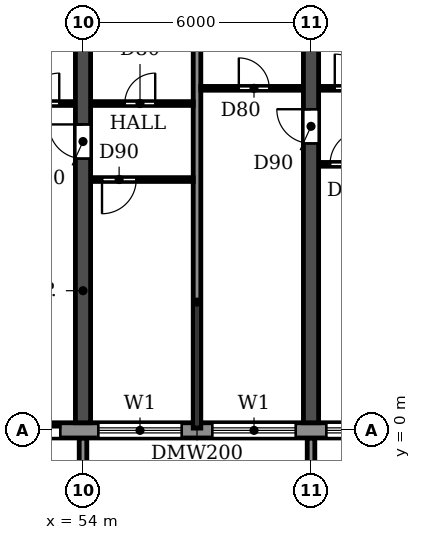
"""IFC4 building model, lengths in metres.
Left out: names, types, materials, properties, quantities, classifications, styles, units other than length and angle.
Written with IfcOpenShell. Run it as: python <this file> out.ifc"""

import sys

from ifc_helpers import new_model, si_unit, direction, frame, frame_2d, origin, place, context, subcontext, project, spatial, polyline, rectangle, outline, extrude, source, transform, mapped, element, fill, save


model = new_model("IFC4")
c1 = context("Model", 3, precision=1e-05, world=origin(), true_north=direction((0.0, 1.0)))
c2 = subcontext(c1, "Body", "Model", "MODEL_VIEW")
j1 = project(units=[si_unit("LENGTHUNIT", "METRE"), si_unit("PLANEANGLEUNIT", "RADIAN")], contexts=[c1])
p1 = place(None, origin())
s1 = spatial("IfcSite", under=j1, at=p1, CompositionType="ELEMENT")
p2 = place(p1, origin())
s2 = spatial("IfcBuilding", under=s1, at=p2, CompositionType="ELEMENT")
p3 = place(p2, frame((0.0, 0.0, 33.3)))
s3 = spatial("IfcBuildingStorey", under=s2, at=p3, CompositionType="ELEMENT", Elevation=33.3)
p4 = place(p3, frame((54.0, 0.2, 0.0), z_axis=(0.0, 0.0, 1.0), x_axis=(0.0, 1.0, 0.0)))
e1 = element("IfcWall", 1, at=p4, inside=s3, PredefinedType="SHEAR", context=c2, shape_type="SweptSolid", body=[
    extrude(rectangle(XDim=11.65, YDim=0.4, at=frame_2d((5.825, 0.0))), origin(), (0.0, 0.0, 1.0), 3.05),
])
p5 = place(p4, frame((6.95, 0.0, 0.0)))
e2 = element("IfcOpeningElement", 2, at=p5, cuts=e1, PredefinedType="OPENING", context=c2, shape_type="SweptSolid", body=[
    extrude(rectangle(XDim=0.9, YDim=2.1, at=frame_2d((0.45, 1.05))), frame((0.0, 0.21, 0.0), z_axis=(0.0, -1.0, 0.0), x_axis=(1.0, 0.0, 0.0)), (0.0, 0.0, 1.0), 0.42),
])
p6 = place(p3, frame((60.0, 0.2, 0.0), z_axis=(0.0, 0.0, 1.0), x_axis=(0.0, 1.0, 0.0)))
e3 = element("IfcWall", 3, at=p6, inside=s3, PredefinedType="SHEAR", context=c2, shape_type="SweptSolid", body=[
    extrude(rectangle(XDim=11.65, YDim=0.4, at=frame_2d((5.825, 0.0))), origin(), (0.0, 0.0, 1.0), 3.05),
])
p7 = place(p6, frame((7.35, 0.0, 0.0)))
e4 = element("IfcOpeningElement", 4, at=p7, cuts=e3, PredefinedType="OPENING", context=c2, shape_type="SweptSolid", body=[
    extrude(rectangle(XDim=0.9, YDim=2.1, at=frame_2d((0.45, 1.05))), frame((0.0, 0.21, 0.0), z_axis=(0.0, -1.0, 0.0), x_axis=(1.0, 0.0, 0.0)), (0.0, 0.0, 1.0), 0.42),
])
p8 = place(p3, frame((4.683, 0.0, 0.0), z_axis=(0.0, 0.0, 1.0), x_axis=(1.0, 0.0, 0.0)))
e5 = element("IfcWall", 5, at=p8, inside=s3, PredefinedType="STANDARD", context=c2, shape_type="SweptSolid", body=[
    extrude(rectangle(XDim=92.634, YDim=0.4, at=frame_2d((46.317, 0.0))), origin(), (0.0, 0.0, 1.0), 3.05),
])
p9 = place(p8, frame((1.717, 0.0, 0.9)))
e6 = element("IfcOpeningElement", 6, at=p9, cuts=e5, PredefinedType="OPENING", context=c2, shape_type="SweptSolid", body=[
    extrude(rectangle(XDim=2.2, YDim=1.5, at=frame_2d((1.1, 0.75))), frame((0.0, 0.21, 0.0), z_axis=(0.0, -1.0, 0.0), x_axis=(1.0, 0.0, 0.0)), (0.0, 0.0, 1.0), 0.42),
])
p10 = place(p8, frame((4.717, 0.0, 0.9)))
e7 = element("IfcOpeningElement", 7, at=p10, cuts=e5, PredefinedType="OPENING", context=c2, shape_type="SweptSolid", body=[
    extrude(rectangle(XDim=2.2, YDim=1.5, at=frame_2d((1.1, 0.75))), frame((0.0, 0.21, 0.0), z_axis=(0.0, -1.0, 0.0), x_axis=(1.0, 0.0, 0.0)), (0.0, 0.0, 1.0), 0.42),
])
p11 = place(p8, frame((7.917, 0.0, 0.0)))
e8 = element("IfcOpeningElement", 8, at=p11, cuts=e5, PredefinedType="OPENING", context=c2, shape_type="SweptSolid", body=[
    extrude(rectangle(XDim=1.8, YDim=2.4, at=frame_2d((0.9, 1.2))), frame((0.0, 0.21, 0.0), z_axis=(0.0, -1.0, 0.0), x_axis=(1.0, 0.0, 0.0)), (0.0, 0.0, 1.0), 0.42),
])
p12 = place(p8, frame((10.717, 0.0, 0.9)))
e9 = element("IfcOpeningElement", 9, at=p12, cuts=e5, PredefinedType="OPENING", context=c2, shape_type="SweptSolid", body=[
    extrude(rectangle(XDim=2.2, YDim=1.5, at=frame_2d((1.1, 0.75))), frame((0.0, 0.21, 0.0), z_axis=(0.0, -1.0, 0.0), x_axis=(1.0, 0.0, 0.0)), (0.0, 0.0, 1.0), 0.42),
])
p13 = place(p8, frame((13.717, 0.0, 0.9)))
e10 = element("IfcOpeningElement", 10, at=p13, cuts=e5, PredefinedType="OPENING", context=c2, shape_type="SweptSolid", body=[
    extrude(rectangle(XDim=2.2, YDim=1.5, at=frame_2d((1.1, 0.75))), frame((0.0, 0.21, 0.0), z_axis=(0.0, -1.0, 0.0), x_axis=(1.0, 0.0, 0.0)), (0.0, 0.0, 1.0), 0.42),
])
p14 = place(p8, frame((16.717, 0.0, 0.9)))
e11 = element("IfcOpeningElement", 11, at=p14, cuts=e5, PredefinedType="OPENING", context=c2, shape_type="SweptSolid", body=[
    extrude(rectangle(XDim=2.2, YDim=1.5, at=frame_2d((1.1, 0.75))), frame((0.0, 0.21, 0.0), z_axis=(0.0, -1.0, 0.0), x_axis=(1.0, 0.0, 0.0)), (0.0, 0.0, 1.0), 0.42),
])
p15 = place(p8, frame((19.717, 0.0, 0.9)))
e12 = element("IfcOpeningElement", 12, at=p15, cuts=e5, PredefinedType="OPENING", context=c2, shape_type="SweptSolid", body=[
    extrude(rectangle(XDim=2.2, YDim=1.5, at=frame_2d((1.1, 0.75))), frame((0.0, 0.21, 0.0), z_axis=(0.0, -1.0, 0.0), x_axis=(1.0, 0.0, 0.0)), (0.0, 0.0, 1.0), 0.42),
])
p16 = place(p8, frame((22.917, 0.0, 0.0)))
e13 = element("IfcOpeningElement", 13, at=p16, cuts=e5, PredefinedType="OPENING", context=c2, shape_type="SweptSolid", body=[
    extrude(rectangle(XDim=1.8, YDim=2.4, at=frame_2d((0.9, 1.2))), frame((0.0, 0.21, 0.0), z_axis=(0.0, -1.0, 0.0), x_axis=(1.0, 0.0, 0.0)), (0.0, 0.0, 1.0), 0.42),
])
p17 = place(p8, frame((25.717, 0.0, 0.9)))
e14 = element("IfcOpeningElement", 14, at=p17, cuts=e5, PredefinedType="OPENING", context=c2, shape_type="SweptSolid", body=[
    extrude(rectangle(XDim=2.2, YDim=1.5, at=frame_2d((1.1, 0.75))), frame((0.0, 0.21, 0.0), z_axis=(0.0, -1.0, 0.0), x_axis=(1.0, 0.0, 0.0)), (0.0, 0.0, 1.0), 0.42),
])
p18 = place(p8, frame((28.717, 0.0, 0.9)))
e15 = element("IfcOpeningElement", 15, at=p18, cuts=e5, PredefinedType="OPENING", context=c2, shape_type="SweptSolid", body=[
    extrude(rectangle(XDim=2.2, YDim=1.5, at=frame_2d((1.1, 0.75))), frame((0.0, 0.21, 0.0), z_axis=(0.0, -1.0, 0.0), x_axis=(1.0, 0.0, 0.0)), (0.0, 0.0, 1.0), 0.42),
])
p19 = place(p8, frame((31.717, 0.0, 0.9)))
e16 = element("IfcOpeningElement", 16, at=p19, cuts=e5, PredefinedType="OPENING", context=c2, shape_type="SweptSolid", body=[
    extrude(rectangle(XDim=2.2, YDim=1.5, at=frame_2d((1.1, 0.75))), frame((0.0, 0.21, 0.0), z_axis=(0.0, -1.0, 0.0), x_axis=(1.0, 0.0, 0.0)), (0.0, 0.0, 1.0), 0.42),
])
p20 = place(p8, frame((34.717, 0.0, 0.9)))
e17 = element("IfcOpeningElement", 17, at=p20, cuts=e5, PredefinedType="OPENING", context=c2, shape_type="SweptSolid", body=[
    extrude(rectangle(XDim=2.2, YDim=1.5, at=frame_2d((1.1, 0.75))), frame((0.0, 0.21, 0.0), z_axis=(0.0, -1.0, 0.0), x_axis=(1.0, 0.0, 0.0)), (0.0, 0.0, 1.0), 0.42),
])
p21 = place(p8, frame((37.717, 0.0, 0.9)))
e18 = element("IfcOpeningElement", 18, at=p21, cuts=e5, PredefinedType="OPENING", context=c2, shape_type="SweptSolid", body=[
    extrude(rectangle(XDim=2.2, YDim=1.5, at=frame_2d((1.1, 0.75))), frame((0.0, 0.21, 0.0), z_axis=(0.0, -1.0, 0.0), x_axis=(1.0, 0.0, 0.0)), (0.0, 0.0, 1.0), 0.42),
])
p22 = place(p8, frame((40.717, 0.0, 0.9)))
e19 = element("IfcOpeningElement", 19, at=p22, cuts=e5, PredefinedType="OPENING", context=c2, shape_type="SweptSolid", body=[
    extrude(rectangle(XDim=2.2, YDim=1.5, at=frame_2d((1.1, 0.75))), frame((0.0, 0.21, 0.0), z_axis=(0.0, -1.0, 0.0), x_axis=(1.0, 0.0, 0.0)), (0.0, 0.0, 1.0), 0.42),
])
p23 = place(p8, frame((43.717, 0.0, 0.9)))
e20 = element("IfcOpeningElement", 20, at=p23, cuts=e5, PredefinedType="OPENING", context=c2, shape_type="SweptSolid", body=[
    extrude(rectangle(XDim=2.2, YDim=1.5, at=frame_2d((1.1, 0.75))), frame((0.0, 0.21, 0.0), z_axis=(0.0, -1.0, 0.0), x_axis=(1.0, 0.0, 0.0)), (0.0, 0.0, 1.0), 0.42),
])
p24 = place(p8, frame((46.917, 0.0, 0.0)))
e21 = element("IfcOpeningElement", 21, at=p24, cuts=e5, PredefinedType="OPENING", context=c2, shape_type="SweptSolid", body=[
    extrude(rectangle(XDim=1.8, YDim=2.4, at=frame_2d((0.9, 1.2))), frame((0.0, 0.21, 0.0), z_axis=(0.0, -1.0, 0.0), x_axis=(1.0, 0.0, 0.0)), (0.0, 0.0, 1.0), 0.42),
])
p25 = place(p8, frame((49.717, 0.0, 0.9)))
e22 = element("IfcOpeningElement", 22, at=p25, cuts=e5, PredefinedType="OPENING", context=c2, shape_type="SweptSolid", body=[
    extrude(rectangle(XDim=2.2, YDim=1.5, at=frame_2d((1.1, 0.75))), frame((0.0, 0.21, 0.0), z_axis=(0.0, -1.0, 0.0), x_axis=(1.0, 0.0, 0.0)), (0.0, 0.0, 1.0), 0.42),
])
p26 = place(p8, frame((52.717, 0.0, 0.9)))
e23 = element("IfcOpeningElement", 23, at=p26, cuts=e5, PredefinedType="OPENING", context=c2, shape_type="SweptSolid", body=[
    extrude(rectangle(XDim=2.2, YDim=1.5, at=frame_2d((1.1, 0.75))), frame((0.0, 0.21, 0.0), z_axis=(0.0, -1.0, 0.0), x_axis=(1.0, 0.0, 0.0)), (0.0, 0.0, 1.0), 0.42),
])
p27 = place(p8, frame((55.717, 0.0, 0.9)))
e24 = element("IfcOpeningElement", 24, at=p27, cuts=e5, PredefinedType="OPENING", context=c2, shape_type="SweptSolid", body=[
    extrude(rectangle(XDim=2.2, YDim=1.5, at=frame_2d((1.1, 0.75))), frame((0.0, 0.21, 0.0), z_axis=(0.0, -1.0, 0.0), x_axis=(1.0, 0.0, 0.0)), (0.0, 0.0, 1.0), 0.42),
])
p28 = place(p8, frame((58.917, 0.0, 0.0)))
e25 = element("IfcOpeningElement", 25, at=p28, cuts=e5, PredefinedType="OPENING", context=c2, shape_type="SweptSolid", body=[
    extrude(rectangle(XDim=1.8, YDim=2.4, at=frame_2d((0.9, 1.2))), frame((0.0, 0.21, 0.0), z_axis=(0.0, -1.0, 0.0), x_axis=(1.0, 0.0, 0.0)), (0.0, 0.0, 1.0), 0.42),
])
p29 = place(p8, frame((61.717, 0.0, 0.9)))
e26 = element("IfcOpeningElement", 26, at=p29, cuts=e5, PredefinedType="OPENING", context=c2, shape_type="SweptSolid", body=[
    extrude(rectangle(XDim=2.2, YDim=1.5, at=frame_2d((1.1, 0.75))), frame((0.0, 0.21, 0.0), z_axis=(0.0, -1.0, 0.0), x_axis=(1.0, 0.0, 0.0)), (0.0, 0.0, 1.0), 0.42),
])
p30 = place(p8, frame((64.717, 0.0, 0.9)))
e27 = element("IfcOpeningElement", 27, at=p30, cuts=e5, PredefinedType="OPENING", context=c2, shape_type="SweptSolid", body=[
    extrude(rectangle(XDim=2.2, YDim=1.5, at=frame_2d((1.1, 0.75))), frame((0.0, 0.21, 0.0), z_axis=(0.0, -1.0, 0.0), x_axis=(1.0, 0.0, 0.0)), (0.0, 0.0, 1.0), 0.42),
])
p31 = place(p8, frame((67.717, 0.0, 0.9)))
e28 = element("IfcOpeningElement", 28, at=p31, cuts=e5, PredefinedType="OPENING", context=c2, shape_type="SweptSolid", body=[
    extrude(rectangle(XDim=2.2, YDim=1.5, at=frame_2d((1.1, 0.75))), frame((0.0, 0.21, 0.0), z_axis=(0.0, -1.0, 0.0), x_axis=(1.0, 0.0, 0.0)), (0.0, 0.0, 1.0), 0.42),
])
p32 = place(p8, frame((70.917, 0.0, 0.0)))
e29 = element("IfcOpeningElement", 29, at=p32, cuts=e5, PredefinedType="OPENING", context=c2, shape_type="SweptSolid", body=[
    extrude(rectangle(XDim=1.8, YDim=2.4, at=frame_2d((0.9, 1.2))), frame((0.0, 0.21, 0.0), z_axis=(0.0, -1.0, 0.0), x_axis=(1.0, 0.0, 0.0)), (0.0, 0.0, 1.0), 0.42),
])
p33 = place(p8, frame((73.717, 0.0, 0.9)))
e30 = element("IfcOpeningElement", 30, at=p33, cuts=e5, PredefinedType="OPENING", context=c2, shape_type="SweptSolid", body=[
    extrude(rectangle(XDim=2.2, YDim=1.5, at=frame_2d((1.1, 0.75))), frame((0.0, 0.21, 0.0), z_axis=(0.0, -1.0, 0.0), x_axis=(1.0, 0.0, 0.0)), (0.0, 0.0, 1.0), 0.42),
])
p34 = place(p8, frame((76.717, 0.0, 0.9)))
e31 = element("IfcOpeningElement", 31, at=p34, cuts=e5, PredefinedType="OPENING", context=c2, shape_type="SweptSolid", body=[
    extrude(rectangle(XDim=2.2, YDim=1.5, at=frame_2d((1.1, 0.75))), frame((0.0, 0.21, 0.0), z_axis=(0.0, -1.0, 0.0), x_axis=(1.0, 0.0, 0.0)), (0.0, 0.0, 1.0), 0.42),
])
p35 = place(p8, frame((79.717, 0.0, 0.9)))
e32 = element("IfcOpeningElement", 32, at=p35, cuts=e5, PredefinedType="OPENING", context=c2, shape_type="SweptSolid", body=[
    extrude(rectangle(XDim=2.2, YDim=1.5, at=frame_2d((1.1, 0.75))), frame((0.0, 0.21, 0.0), z_axis=(0.0, -1.0, 0.0), x_axis=(1.0, 0.0, 0.0)), (0.0, 0.0, 1.0), 0.42),
])
p36 = place(p8, frame((82.717, 0.0, 0.9)))
e33 = element("IfcOpeningElement", 33, at=p36, cuts=e5, PredefinedType="OPENING", context=c2, shape_type="SweptSolid", body=[
    extrude(rectangle(XDim=2.2, YDim=1.5, at=frame_2d((1.1, 0.75))), frame((0.0, 0.21, 0.0), z_axis=(0.0, -1.0, 0.0), x_axis=(1.0, 0.0, 0.0)), (0.0, 0.0, 1.0), 0.42),
])
p37 = place(p8, frame((85.717, 0.0, 0.9)))
e34 = element("IfcOpeningElement", 34, at=p37, cuts=e5, PredefinedType="OPENING", context=c2, shape_type="SweptSolid", body=[
    extrude(rectangle(XDim=2.2, YDim=1.5, at=frame_2d((1.1, 0.75))), frame((0.0, 0.21, 0.0), z_axis=(0.0, -1.0, 0.0), x_axis=(1.0, 0.0, 0.0)), (0.0, 0.0, 1.0), 0.42),
])
p38 = place(p8, frame((88.717, 0.0, 0.9)))
e35 = element("IfcOpeningElement", 35, at=p38, cuts=e5, PredefinedType="OPENING", context=c2, shape_type="SweptSolid", body=[
    extrude(rectangle(XDim=2.2, YDim=1.5, at=frame_2d((1.1, 0.75))), frame((0.0, 0.21, 0.0), z_axis=(0.0, -1.0, 0.0), x_axis=(1.0, 0.0, 0.0)), (0.0, 0.0, 1.0), 0.42),
])
m1 = source(origin(), c2, "Body", "SweptSolid", [
    extrude(outline(polyline([(0.0, 0.0), (0.2, 0.0), (0.2, 1.65), (0.0, 1.65), (0.0, 0.0)])), origin(), (0.0, 0.0, 1.0), 3.1),
])
for number, where in (
    (36, (53.9, -1.85, 0.0)),
    (37, (59.9, -1.85, 0.0)),
):
    element("IfcWall", number, at=place(p3, frame(where)), inside=s3, PredefinedType="STANDARD", context=c2, shape_type="MappedRepresentation", body=[
        mapped(m1, transform((0.0, 0.0, 0.0))),
    ])
p39 = place(p3, frame((57.0, 0.06, 0.0), z_axis=(0.0, 0.0, 1.0), x_axis=(0.0, 1.0, 0.0)))
e38 = element("IfcWall", 38, at=p39, inside=s3, PredefinedType="PARTITIONING", context=c2, shape_type="SweptSolid", body=[
    extrude(rectangle(XDim=11.78, YDim=0.2, at=frame_2d((5.89, 0.0))), origin(), (0.0, 0.0, 1.0), 3.05),
])
p40 = place(p3, frame((54.21, 6.6, 0.0), z_axis=(0.0, 0.0, 1.0), x_axis=(1.0, 0.0, 0.0)))
e39 = element("IfcWall", 39, at=p40, inside=s3, PredefinedType="PARTITIONING", context=c2, shape_type="SweptSolid", body=[
    extrude(rectangle(XDim=2.69, YDim=0.1, at=frame_2d((1.345, 0.0))), origin(), (0.0, 0.0, 1.0), 3.05),
])
p41 = place(p40, frame((0.29, 0.0, 0.0)))
e40 = element("IfcOpeningElement", 40, at=p41, cuts=e39, PredefinedType="OPENING", context=c2, shape_type="SweptSolid", body=[
    extrude(rectangle(XDim=0.9, YDim=2.1, at=frame_2d((0.45, 1.05))), frame((0.0, 0.06, 0.0), z_axis=(0.0, -1.0, 0.0), x_axis=(1.0, 0.0, 0.0)), (0.0, 0.0, 1.0), 0.12),
])
p42 = place(p3, frame((60.21, 7.0, 0.0), z_axis=(0.0, 0.0, 1.0), x_axis=(1.0, 0.0, 0.0)))
e41 = element("IfcWall", 41, at=p42, inside=s3, PredefinedType="PARTITIONING", context=c2, shape_type="SweptSolid", body=[
    extrude(rectangle(XDim=2.84, YDim=0.1, at=frame_2d((1.42, 0.0))), origin(), (0.0, 0.0, 1.0), 3.05),
])
p43 = place(p42, frame((0.29, 0.0, 0.0)))
e42 = element("IfcOpeningElement", 42, at=p43, cuts=e41, PredefinedType="OPENING", context=c2, shape_type="SweptSolid", body=[
    extrude(rectangle(XDim=0.9, YDim=2.1, at=frame_2d((0.45, 1.05))), frame((0.0, 0.06, 0.0), z_axis=(0.0, -1.0, 0.0), x_axis=(1.0, 0.0, 0.0)), (0.0, 0.0, 1.0), 0.12),
])
p44 = place(p3, frame((51.9, 8.6, 0.0), z_axis=(0.0, 0.0, 1.0), x_axis=(1.0, 0.0, 0.0)))
e43 = element("IfcWall", 43, at=p44, inside=s3, PredefinedType="PARTITIONING", context=c2, shape_type="SweptSolid", body=[
    extrude(rectangle(XDim=1.89, YDim=0.1, at=frame_2d((0.945, 0.0))), origin(), (0.0, 0.0, 1.0), 3.05),
])
p45 = place(p44, frame((0.675, 0.0, 0.0)))
e44 = element("IfcOpeningElement", 44, at=p45, cuts=e43, PredefinedType="OPENING", context=c2, shape_type="SweptSolid", body=[
    extrude(rectangle(XDim=0.8, YDim=2.1, at=frame_2d((0.4, 1.05))), frame((0.0, 0.06, 0.0), z_axis=(0.0, -1.0, 0.0), x_axis=(1.0, 0.0, 0.0)), (0.0, 0.0, 1.0), 0.12),
])
p46 = place(p3, frame((54.21, 8.6, 0.0), z_axis=(0.0, 0.0, 1.0), x_axis=(1.0, 0.0, 0.0)))
e45 = element("IfcWall", 45, at=p46, inside=s3, PredefinedType="PARTITIONING", context=c2, shape_type="SweptSolid", body=[
    extrude(rectangle(XDim=2.69, YDim=0.1, at=frame_2d((1.345, 0.0))), origin(), (0.0, 0.0, 1.0), 3.05),
])
p47 = place(p46, frame((0.89, 0.0, 0.0)))
e46 = element("IfcOpeningElement", 46, at=p47, cuts=e45, PredefinedType="OPENING", context=c2, shape_type="SweptSolid", body=[
    extrude(rectangle(XDim=0.8, YDim=2.1, at=frame_2d((0.4, 1.05))), frame((0.0, 0.06, 0.0), z_axis=(0.0, -1.0, 0.0), x_axis=(1.0, 0.0, 0.0)), (0.0, 0.0, 1.0), 0.12),
])
p48 = place(p3, frame((57.1, 9.0, 0.0), z_axis=(0.0, 0.0, 1.0), x_axis=(1.0, 0.0, 0.0)))
e47 = element("IfcWall", 47, at=p48, inside=s3, PredefinedType="PARTITIONING", context=c2, shape_type="SweptSolid", body=[
    extrude(rectangle(XDim=2.69, YDim=0.1, at=frame_2d((1.345, 0.0))), origin(), (0.0, 0.0, 1.0), 3.05),
])
p49 = place(p48, frame((1.0, 0.0, 0.0)))
e48 = element("IfcOpeningElement", 48, at=p49, cuts=e47, PredefinedType="OPENING", context=c2, shape_type="SweptSolid", body=[
    extrude(rectangle(XDim=0.8, YDim=2.1, at=frame_2d((0.4, 1.05))), frame((0.0, 0.06, 0.0), z_axis=(0.0, -1.0, 0.0), x_axis=(1.0, 0.0, 0.0)), (0.0, 0.0, 1.0), 0.12),
])
p50 = place(p3, frame((60.21, 9.0, 0.0), z_axis=(0.0, 0.0, 1.0), x_axis=(1.0, 0.0, 0.0)))
e49 = element("IfcWall", 49, at=p50, inside=s3, PredefinedType="PARTITIONING", context=c2, shape_type="SweptSolid", body=[
    extrude(rectangle(XDim=1.99, YDim=0.1, at=frame_2d((0.995, 0.0))), origin(), (0.0, 0.0, 1.0), 3.05),
])
p51 = place(p50, frame((0.415, 0.0, 0.0)))
e50 = element("IfcOpeningElement", 50, at=p51, cuts=e49, PredefinedType="OPENING", context=c2, shape_type="SweptSolid", body=[
    extrude(rectangle(XDim=0.9, YDim=2.1, at=frame_2d((0.45, 1.05))), frame((0.0, 0.06, 0.0), z_axis=(0.0, -1.0, 0.0), x_axis=(1.0, 0.0, 0.0)), (0.0, 0.0, 1.0), 0.12),
])
p52 = place(p24, origin())
e51 = element("IfcDoor", 51, at=p52, inside=s3, OperationType="DOUBLE_DOOR_SLIDING", PredefinedType="DOOR", context=c2, shape_type="SweptSolid", body=[
    extrude(rectangle(XDim=1.8, YDim=2.4, at=frame_2d((0.9, 1.2))), frame((0.0, 0.025, 0.0), z_axis=(0.0, -1.0, 0.0), x_axis=(1.0, 0.0, 0.0)), (0.0, 0.0, 1.0), 0.05),
])
fill(e21, e51)
p53 = place(p25, origin())
e52 = element("IfcWindow", 52, at=p53, inside=s3, PartitioningType="DOUBLE_PANEL_HORIZONTAL", PredefinedType="WINDOW", context=c2, shape_type="SweptSolid", body=[
    extrude(rectangle(XDim=2.2, YDim=1.5, at=frame_2d((1.1, 0.75))), frame((0.0, 0.03, 0.0), z_axis=(0.0, -1.0, 0.0), x_axis=(1.0, 0.0, 0.0)), (0.0, 0.0, 1.0), 0.06),
])
fill(e22, e52)
p54 = place(p26, origin())
e53 = element("IfcWindow", 53, at=p54, inside=s3, PartitioningType="DOUBLE_PANEL_HORIZONTAL", PredefinedType="WINDOW", context=c2, shape_type="SweptSolid", body=[
    extrude(rectangle(XDim=2.2, YDim=1.5, at=frame_2d((1.1, 0.75))), frame((0.0, 0.03, 0.0), z_axis=(0.0, -1.0, 0.0), x_axis=(1.0, 0.0, 0.0)), (0.0, 0.0, 1.0), 0.06),
])
fill(e23, e53)
p55 = place(p27, origin())
e54 = element("IfcWindow", 54, at=p55, inside=s3, PartitioningType="DOUBLE_PANEL_HORIZONTAL", PredefinedType="WINDOW", context=c2, shape_type="SweptSolid", body=[
    extrude(rectangle(XDim=2.2, YDim=1.5, at=frame_2d((1.1, 0.75))), frame((0.0, 0.03, 0.0), z_axis=(0.0, -1.0, 0.0), x_axis=(1.0, 0.0, 0.0)), (0.0, 0.0, 1.0), 0.06),
])
fill(e24, e54)
p56 = place(p41, frame((0.9, 0.0, 0.0), z_axis=(0.0, 0.0, 1.0), x_axis=(-1.0, 0.0, 0.0)))
e55 = element("IfcDoor", 55, at=p56, inside=s3, OperationType="SINGLE_SWING_RIGHT", PredefinedType="DOOR", context=c2, shape_type="SweptSolid", body=[
    extrude(rectangle(XDim=0.9, YDim=2.1, at=frame_2d((0.45, 1.05))), frame((0.0, 0.025, 0.0), z_axis=(0.0, -1.0, 0.0), x_axis=(1.0, 0.0, 0.0)), (0.0, 0.0, 1.0), 0.05),
])
fill(e40, e55)
p57 = place(p47, origin())
e56 = element("IfcDoor", 56, at=p57, inside=s3, OperationType="SINGLE_SWING_RIGHT", PredefinedType="DOOR", context=c2, shape_type="SweptSolid", body=[
    extrude(rectangle(XDim=0.8, YDim=2.1, at=frame_2d((0.4, 1.05))), frame((0.0, 0.025, 0.0), z_axis=(0.0, -1.0, 0.0), x_axis=(1.0, 0.0, 0.0)), (0.0, 0.0, 1.0), 0.05),
])
fill(e46, e56)
p58 = place(p45, origin())
e57 = element("IfcDoor", 57, at=p58, inside=s3, OperationType="SINGLE_SWING_RIGHT", PredefinedType="DOOR", context=c2, shape_type="SweptSolid", body=[
    extrude(rectangle(XDim=0.8, YDim=2.1, at=frame_2d((0.4, 1.05))), frame((0.0, 0.025, 0.0), z_axis=(0.0, -1.0, 0.0), x_axis=(1.0, 0.0, 0.0)), (0.0, 0.0, 1.0), 0.05),
])
fill(e44, e57)
p59 = place(p5, origin())
e58 = element("IfcDoor", 58, at=p59, inside=s3, OperationType="SINGLE_SWING_RIGHT", PredefinedType="DOOR", context=c2, shape_type="SweptSolid", body=[
    extrude(rectangle(XDim=0.9, YDim=2.1, at=frame_2d((0.45, 1.05))), frame((0.0, 0.025, 0.0), z_axis=(0.0, -1.0, 0.0), x_axis=(1.0, 0.0, 0.0)), (0.0, 0.0, 1.0), 0.05),
])
fill(e2, e58)
p60 = place(p49, origin())
e59 = element("IfcDoor", 59, at=p60, inside=s3, OperationType="SINGLE_SWING_LEFT", PredefinedType="DOOR", context=c2, shape_type="SweptSolid", body=[
    extrude(rectangle(XDim=0.8, YDim=2.1, at=frame_2d((0.4, 1.05))), frame((0.0, 0.025, 0.0), z_axis=(0.0, -1.0, 0.0), x_axis=(1.0, 0.0, 0.0)), (0.0, 0.0, 1.0), 0.05),
])
fill(e48, e59)
p61 = place(p7, origin())
e60 = element("IfcDoor", 60, at=p61, inside=s3, OperationType="SINGLE_SWING_RIGHT", PredefinedType="DOOR", context=c2, shape_type="SweptSolid", body=[
    extrude(rectangle(XDim=0.9, YDim=2.1, at=frame_2d((0.45, 1.05))), frame((0.0, 0.025, 0.0), z_axis=(0.0, -1.0, 0.0), x_axis=(1.0, 0.0, 0.0)), (0.0, 0.0, 1.0), 0.05),
])
fill(e4, e60)
p62 = place(p43, origin())
e61 = element("IfcDoor", 61, at=p62, inside=s3, OperationType="SINGLE_SWING_RIGHT", PredefinedType="DOOR", context=c2, shape_type="SweptSolid", body=[
    extrude(rectangle(XDim=0.9, YDim=2.1, at=frame_2d((0.45, 1.05))), frame((0.0, 0.025, 0.0), z_axis=(0.0, -1.0, 0.0), x_axis=(1.0, 0.0, 0.0)), (0.0, 0.0, 1.0), 0.05),
])
fill(e42, e61)
p63 = place(p51, origin())
e62 = element("IfcDoor", 62, at=p63, inside=s3, OperationType="SINGLE_SWING_LEFT", PredefinedType="DOOR", context=c2, shape_type="SweptSolid", body=[
    extrude(rectangle(XDim=0.9, YDim=2.1, at=frame_2d((0.45, 1.05))), frame((0.0, 0.025, 0.0), z_axis=(0.0, -1.0, 0.0), x_axis=(1.0, 0.0, 0.0)), (0.0, 0.0, 1.0), 0.05),
])
fill(e50, e62)
save(model, sys.argv[1])
